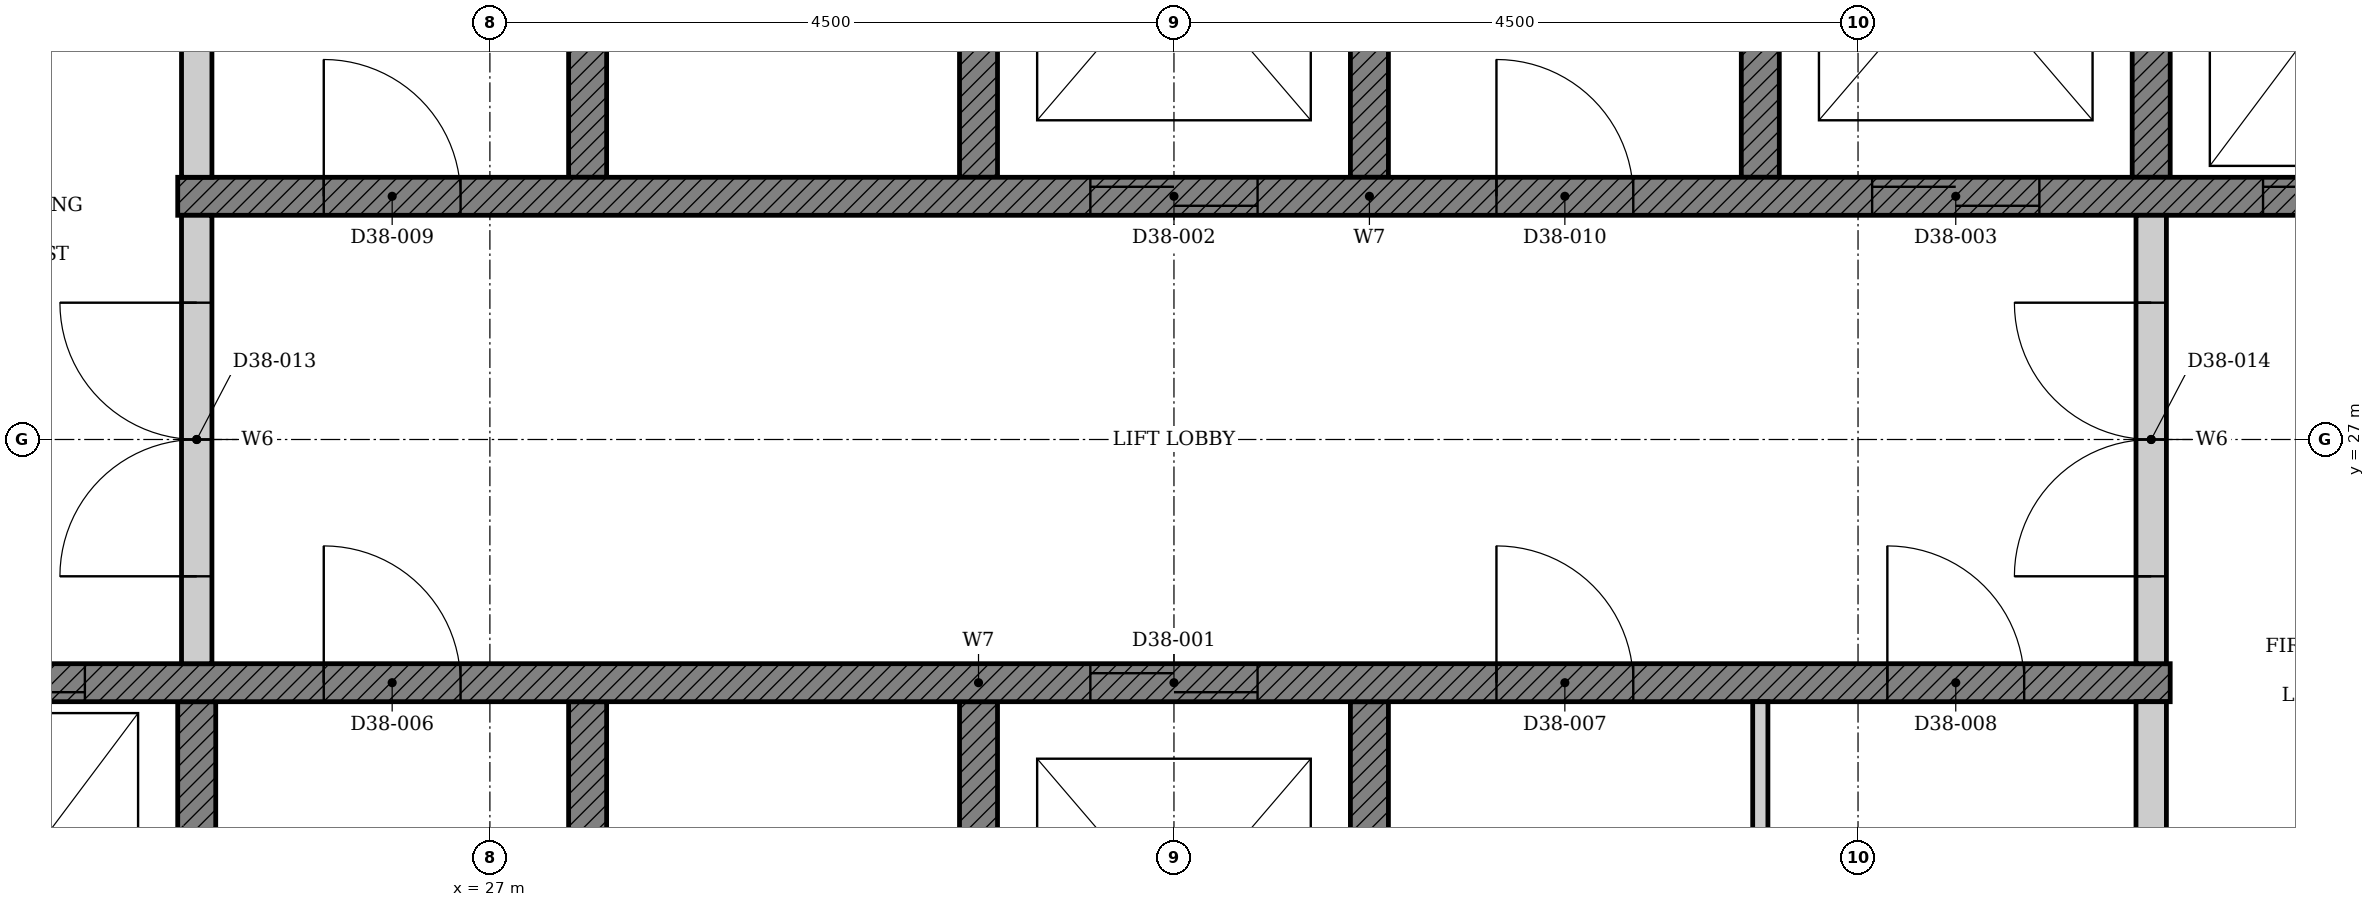
"""IFC4 building model, lengths in metres.
Left out: names, types, materials, properties, quantities, classifications, styles, units other than length and angle.
Written with IfcOpenShell. Run it as: python <this file> out.ifc"""

import sys

from ifc_helpers import new_model, si_unit, direction, frame, frame_2d, origin, place, context, subcontext, project, spatial, polyline, rectangle, outline, extrude, element, fill, save


model = new_model("IFC4")
c1 = context("Model", 3, precision=1e-05, world=origin(), true_north=direction((0.0, 1.0)))
c2 = subcontext(c1, "Body", "Model", "MODEL_VIEW")
j1 = project(units=[si_unit("LENGTHUNIT", "METRE"), si_unit("PLANEANGLEUNIT", "RADIAN")], contexts=[c1])
p1 = place(None, origin())
s1 = spatial("IfcSite", under=j1, at=p1, CompositionType="ELEMENT")
p2 = place(p1, origin())
s2 = spatial("IfcBuilding", under=s1, at=p2, CompositionType="ELEMENT")
p3 = place(p2, frame((0.0, 0.0, 154.3)))
s3 = spatial("IfcBuildingStorey", under=s2, at=p3, CompositionType="ELEMENT", Elevation=154.3)
p4 = place(p3, origin())
e1 = element("IfcWall", 1, at=p4, inside=s3, PredefinedType="SHEAR", context=c2, shape_type="SweptSolid", body=[
    extrude(outline(polyline([(22.375, 22.35), (25.197, 22.35), (25.197, 25.275), (24.947, 25.275), (24.947, 22.65), (22.625, 22.65), (22.625, 25.275), (22.375, 25.275), (22.375, 22.35)])), origin(), (0.0, 0.0, 1.0), 3.4),
])
p5 = place(p3, origin())
e2 = element("IfcWall", 2, at=p5, inside=s3, PredefinedType="SHEAR", context=c2, shape_type="SweptSolid", body=[
    extrude(outline(polyline([(27.518, 22.35), (32.911, 22.35), (32.911, 25.275), (32.661, 25.275), (32.661, 22.65), (30.339, 22.65), (30.339, 25.275), (30.089, 25.275), (30.089, 22.65), (27.768, 22.65), (27.768, 25.275), (27.518, 25.275), (27.518, 22.35)])), origin(), (0.0, 0.0, 1.0), 3.4),
])
p6 = place(p3, origin())
e3 = element("IfcWall", 3, at=p6, inside=s3, PredefinedType="SHEAR", context=c2, shape_type="SweptSolid", body=[
    extrude(outline(polyline([(27.518, 28.725), (27.768, 28.725), (27.768, 31.35), (30.089, 31.35), (30.089, 28.725), (30.339, 28.725), (30.339, 31.35), (32.661, 31.35), (32.661, 28.725), (32.911, 28.725), (32.911, 31.65), (27.518, 31.65), (27.518, 28.725)])), origin(), (0.0, 0.0, 1.0), 3.4),
])
p7 = place(p3, origin())
e4 = element("IfcWall", 4, at=p7, inside=s3, PredefinedType="SHEAR", context=c2, shape_type="SweptSolid", body=[
    extrude(outline(polyline([(35.232, 28.725), (35.482, 28.725), (35.482, 31.35), (37.803, 31.35), (37.803, 28.725), (38.053, 28.725), (38.053, 31.35), (40.375, 31.35), (40.375, 28.725), (40.625, 28.725), (40.625, 31.65), (35.232, 31.65), (35.232, 28.725)])), origin(), (0.0, 0.0, 1.0), 3.4),
])
p8 = place(p3, frame((22.375, 25.4, 0.0), z_axis=(0.0, 0.0, 1.0), x_axis=(1.0, 0.0, 0.0)))
e5 = element("IfcWall", 5, at=p8, inside=s3, PredefinedType="SHEAR", context=c2, shape_type="SweptSolid", body=[
    extrude(rectangle(XDim=15.678, YDim=0.25, at=frame_2d((7.839, 0.0))), origin(), (0.0, 0.0, 1.0), 3.4),
])
p9 = place(p8, frame((8.575, 0.0, 0.0)))
e6 = element("IfcOpeningElement", 6, at=p9, cuts=e5, PredefinedType="OPENING", context=c2, shape_type="SweptSolid", body=[
    extrude(rectangle(XDim=1.1, YDim=2.1, at=frame_2d((0.55, 1.05))), frame((0.0, 0.135, 0.0), z_axis=(0.0, -1.0, 0.0), x_axis=(1.0, 0.0, 0.0)), (0.0, 0.0, 1.0), 0.27),
])
p10 = place(p8, frame((0.861, 0.0, 0.0)))
e7 = element("IfcOpeningElement", 7, at=p10, cuts=e5, PredefinedType="OPENING", context=c2, shape_type="SweptSolid", body=[
    extrude(rectangle(XDim=1.1, YDim=2.1, at=frame_2d((0.55, 1.05))), frame((0.0, 0.135, 0.0), z_axis=(0.0, -1.0, 0.0), x_axis=(1.0, 0.0, 0.0)), (0.0, 0.0, 1.0), 0.27),
])
p11 = place(p8, frame((3.532, 0.0, 0.0)))
e8 = element("IfcOpeningElement", 8, at=p11, cuts=e5, PredefinedType="OPENING", context=c2, shape_type="SweptSolid", body=[
    extrude(rectangle(XDim=0.9, YDim=2.1, at=frame_2d((0.45, 1.05))), frame((0.0, 0.135, 0.0), z_axis=(0.0, -1.0, 0.0), x_axis=(1.0, 0.0, 0.0)), (0.0, 0.0, 1.0), 0.27),
])
p12 = place(p8, frame((11.246, 0.0, 0.0)))
e9 = element("IfcOpeningElement", 9, at=p12, cuts=e5, PredefinedType="OPENING", context=c2, shape_type="SweptSolid", body=[
    extrude(rectangle(XDim=0.9, YDim=2.1, at=frame_2d((0.45, 1.05))), frame((0.0, 0.135, 0.0), z_axis=(0.0, -1.0, 0.0), x_axis=(1.0, 0.0, 0.0)), (0.0, 0.0, 1.0), 0.27),
])
p13 = place(p8, frame((13.818, 0.0, 0.0)))
e10 = element("IfcOpeningElement", 10, at=p13, cuts=e5, PredefinedType="OPENING", context=c2, shape_type="SweptSolid", body=[
    extrude(rectangle(XDim=0.9, YDim=2.1, at=frame_2d((0.45, 1.05))), frame((0.0, 0.135, 0.0), z_axis=(0.0, -1.0, 0.0), x_axis=(1.0, 0.0, 0.0)), (0.0, 0.0, 1.0), 0.27),
])
p14 = place(p3, frame((24.947, 28.6, 0.0), z_axis=(0.0, 0.0, 1.0), x_axis=(1.0, 0.0, 0.0)))
e11 = element("IfcWall", 11, at=p14, inside=s3, PredefinedType="SHEAR", context=c2, shape_type="SweptSolid", body=[
    extrude(rectangle(XDim=15.678, YDim=0.25, at=frame_2d((7.839, 0.0))), origin(), (0.0, 0.0, 1.0), 3.4),
])
p15 = place(p14, frame((6.004, 0.0, 0.0)))
e12 = element("IfcOpeningElement", 12, at=p15, cuts=e11, PredefinedType="OPENING", context=c2, shape_type="SweptSolid", body=[
    extrude(rectangle(XDim=1.1, YDim=2.1, at=frame_2d((0.55, 1.05))), frame((0.0, 0.135, 0.0), z_axis=(0.0, -1.0, 0.0), x_axis=(1.0, 0.0, 0.0)), (0.0, 0.0, 1.0), 0.27),
])
p16 = place(p14, frame((11.146, 0.0, 0.0)))
e13 = element("IfcOpeningElement", 13, at=p16, cuts=e11, PredefinedType="OPENING", context=c2, shape_type="SweptSolid", body=[
    extrude(rectangle(XDim=1.1, YDim=2.1, at=frame_2d((0.55, 1.05))), frame((0.0, 0.135, 0.0), z_axis=(0.0, -1.0, 0.0), x_axis=(1.0, 0.0, 0.0)), (0.0, 0.0, 1.0), 0.27),
])
p17 = place(p14, frame((13.718, 0.0, 0.0)))
e14 = element("IfcOpeningElement", 14, at=p17, cuts=e11, PredefinedType="OPENING", context=c2, shape_type="SweptSolid", body=[
    extrude(rectangle(XDim=1.1, YDim=2.1, at=frame_2d((0.55, 1.05))), frame((0.0, 0.135, 0.0), z_axis=(0.0, -1.0, 0.0), x_axis=(1.0, 0.0, 0.0)), (0.0, 0.0, 1.0), 0.27),
])
p18 = place(p14, frame((0.961, 0.0, 0.0)))
e15 = element("IfcOpeningElement", 15, at=p18, cuts=e11, PredefinedType="OPENING", context=c2, shape_type="SweptSolid", body=[
    extrude(rectangle(XDim=0.9, YDim=2.1, at=frame_2d((0.45, 1.05))), frame((0.0, 0.135, 0.0), z_axis=(0.0, -1.0, 0.0), x_axis=(1.0, 0.0, 0.0)), (0.0, 0.0, 1.0), 0.27),
])
p19 = place(p14, frame((8.675, 0.0, 0.0)))
e16 = element("IfcOpeningElement", 16, at=p19, cuts=e11, PredefinedType="OPENING", context=c2, shape_type="SweptSolid", body=[
    extrude(rectangle(XDim=0.9, YDim=2.1, at=frame_2d((0.45, 1.05))), frame((0.0, 0.135, 0.0), z_axis=(0.0, -1.0, 0.0), x_axis=(1.0, 0.0, 0.0)), (0.0, 0.0, 1.0), 0.27),
])
p20 = place(p3, frame((37.928, 22.65, 0.0), z_axis=(0.0, 0.0, 1.0), x_axis=(0.0, 1.0, 0.0)))
e17 = element("IfcWall", 17, at=p20, inside=s3, PredefinedType="PARTITIONING", context=c2, shape_type="SweptSolid", body=[
    extrude(rectangle(XDim=2.625, YDim=0.2, at=frame_2d((1.312, 0.0))), origin(), (0.0, 0.0, 1.0), 3.4),
])
p21 = place(p3, frame((35.357, 22.65, 0.0), z_axis=(0.0, 0.0, 1.0), x_axis=(0.0, 1.0, 0.0)))
e18 = element("IfcWall", 18, at=p21, inside=s3, PredefinedType="PARTITIONING", context=c2, shape_type="SweptSolid", body=[
    extrude(rectangle(XDim=2.625, YDim=0.1, at=frame_2d((1.312, 0.0))), origin(), (0.0, 0.0, 1.0), 3.4),
])
p22 = place(p3, frame((25.072, 28.725, 0.0), z_axis=(0.0, 0.0, 1.0), x_axis=(0.0, 1.0, 0.0)))
e19 = element("IfcWall", 19, at=p22, inside=s3, PredefinedType="PARTITIONING", context=c2, shape_type="SweptSolid", body=[
    extrude(rectangle(XDim=2.625, YDim=0.2, at=frame_2d((1.312, 0.0))), origin(), (0.0, 0.0, 1.0), 3.4),
])
p23 = place(p3, frame((25.072, 25.525, 0.0), z_axis=(0.0, 0.0, 1.0), x_axis=(0.0, 1.0, 0.0)))
e20 = element("IfcWall", 20, at=p23, inside=s3, PredefinedType="PARTITIONING", context=c2, shape_type="SweptSolid", body=[
    extrude(rectangle(XDim=2.95, YDim=0.2, at=frame_2d((1.475, 0.0))), origin(), (0.0, 0.0, 1.0), 3.4),
])
p24 = place(p23, frame((0.575, 0.0, 0.0)))
e21 = element("IfcOpeningElement", 21, at=p24, cuts=e20, PredefinedType="OPENING", context=c2, shape_type="SweptSolid", body=[
    extrude(rectangle(XDim=1.8, YDim=2.1, at=frame_2d((0.9, 1.05))), frame((0.0, 0.11, 0.0), z_axis=(0.0, -1.0, 0.0), x_axis=(1.0, 0.0, 0.0)), (0.0, 0.0, 1.0), 0.22),
])
p25 = place(p3, frame((37.928, 25.525, 0.0), z_axis=(0.0, 0.0, 1.0), x_axis=(0.0, 1.0, 0.0)))
e22 = element("IfcWall", 22, at=p25, inside=s3, PredefinedType="PARTITIONING", context=c2, shape_type="SweptSolid", body=[
    extrude(rectangle(XDim=2.95, YDim=0.2, at=frame_2d((1.475, 0.0))), origin(), (0.0, 0.0, 1.0), 3.4),
])
p26 = place(p25, frame((0.575, 0.0, 0.0)))
e23 = element("IfcOpeningElement", 23, at=p26, cuts=e22, PredefinedType="OPENING", context=c2, shape_type="SweptSolid", body=[
    extrude(rectangle(XDim=1.8, YDim=2.1, at=frame_2d((0.9, 1.05))), frame((0.0, 0.11, 0.0), z_axis=(0.0, -1.0, 0.0), x_axis=(1.0, 0.0, 0.0)), (0.0, 0.0, 1.0), 0.22),
])
p27 = place(p9, origin())
e24 = element("IfcDoor", 24, at=p27, inside=s3, OperationType="DOUBLE_DOOR_SLIDING", PredefinedType="DOOR", context=c2, shape_type="SweptSolid", body=[
    extrude(rectangle(XDim=1.1, YDim=2.1, at=frame_2d((0.55, 1.05))), frame((0.0, 0.025, 0.0), z_axis=(0.0, -1.0, 0.0), x_axis=(1.0, 0.0, 0.0)), (0.0, 0.0, 1.0), 0.05),
])
fill(e6, e24)
p28 = place(p15, origin())
e25 = element("IfcDoor", 25, at=p28, inside=s3, OperationType="DOUBLE_DOOR_SLIDING", PredefinedType="DOOR", context=c2, shape_type="SweptSolid", body=[
    extrude(rectangle(XDim=1.1, YDim=2.1, at=frame_2d((0.55, 1.05))), frame((0.0, 0.025, 0.0), z_axis=(0.0, -1.0, 0.0), x_axis=(1.0, 0.0, 0.0)), (0.0, 0.0, 1.0), 0.05),
])
fill(e12, e25)
p29 = place(p16, origin())
e26 = element("IfcDoor", 26, at=p29, inside=s3, OperationType="DOUBLE_DOOR_SLIDING", PredefinedType="DOOR", context=c2, shape_type="SweptSolid", body=[
    extrude(rectangle(XDim=1.1, YDim=2.1, at=frame_2d((0.55, 1.05))), frame((0.0, 0.025, 0.0), z_axis=(0.0, -1.0, 0.0), x_axis=(1.0, 0.0, 0.0)), (0.0, 0.0, 1.0), 0.05),
])
fill(e13, e26)
p30 = place(p10, origin())
e27 = element("IfcDoor", 27, at=p30, inside=s3, OperationType="DOUBLE_DOOR_SLIDING", PredefinedType="DOOR", context=c2, shape_type="SweptSolid", body=[
    extrude(rectangle(XDim=1.1, YDim=2.1, at=frame_2d((0.55, 1.05))), frame((0.0, 0.025, 0.0), z_axis=(0.0, -1.0, 0.0), x_axis=(1.0, 0.0, 0.0)), (0.0, 0.0, 1.0), 0.05),
])
fill(e7, e27)
p31 = place(p17, origin())
e28 = element("IfcDoor", 28, at=p31, inside=s3, OperationType="DOUBLE_DOOR_SLIDING", PredefinedType="DOOR", context=c2, shape_type="SweptSolid", body=[
    extrude(rectangle(XDim=1.1, YDim=2.1, at=frame_2d((0.55, 1.05))), frame((0.0, 0.025, 0.0), z_axis=(0.0, -1.0, 0.0), x_axis=(1.0, 0.0, 0.0)), (0.0, 0.0, 1.0), 0.05),
])
fill(e14, e28)
p32 = place(p11, origin())
e29 = element("IfcDoor", 29, at=p32, inside=s3, OperationType="SINGLE_SWING_LEFT", PredefinedType="DOOR", context=c2, shape_type="SweptSolid", body=[
    extrude(rectangle(XDim=0.9, YDim=2.1, at=frame_2d((0.45, 1.05))), frame((0.0, 0.025, 0.0), z_axis=(0.0, -1.0, 0.0), x_axis=(1.0, 0.0, 0.0)), (0.0, 0.0, 1.0), 0.05),
])
fill(e8, e29)
p33 = place(p12, origin())
e30 = element("IfcDoor", 30, at=p33, inside=s3, OperationType="SINGLE_SWING_LEFT", PredefinedType="DOOR", context=c2, shape_type="SweptSolid", body=[
    extrude(rectangle(XDim=0.9, YDim=2.1, at=frame_2d((0.45, 1.05))), frame((0.0, 0.025, 0.0), z_axis=(0.0, -1.0, 0.0), x_axis=(1.0, 0.0, 0.0)), (0.0, 0.0, 1.0), 0.05),
])
fill(e9, e30)
p34 = place(p13, origin())
e31 = element("IfcDoor", 31, at=p34, inside=s3, OperationType="SINGLE_SWING_LEFT", PredefinedType="DOOR", context=c2, shape_type="SweptSolid", body=[
    extrude(rectangle(XDim=0.9, YDim=2.1, at=frame_2d((0.45, 1.05))), frame((0.0, 0.025, 0.0), z_axis=(0.0, -1.0, 0.0), x_axis=(1.0, 0.0, 0.0)), (0.0, 0.0, 1.0), 0.05),
])
fill(e10, e31)
p35 = place(p18, origin())
e32 = element("IfcDoor", 32, at=p35, inside=s3, OperationType="SINGLE_SWING_LEFT", PredefinedType="DOOR", context=c2, shape_type="SweptSolid", body=[
    extrude(rectangle(XDim=0.9, YDim=2.1, at=frame_2d((0.45, 1.05))), frame((0.0, 0.025, 0.0), z_axis=(0.0, -1.0, 0.0), x_axis=(1.0, 0.0, 0.0)), (0.0, 0.0, 1.0), 0.05),
])
fill(e15, e32)
p36 = place(p19, origin())
e33 = element("IfcDoor", 33, at=p36, inside=s3, OperationType="SINGLE_SWING_LEFT", PredefinedType="DOOR", context=c2, shape_type="SweptSolid", body=[
    extrude(rectangle(XDim=0.9, YDim=2.1, at=frame_2d((0.45, 1.05))), frame((0.0, 0.025, 0.0), z_axis=(0.0, -1.0, 0.0), x_axis=(1.0, 0.0, 0.0)), (0.0, 0.0, 1.0), 0.05),
])
fill(e16, e33)
p37 = place(p24, origin())
e34 = element("IfcDoor", 34, at=p37, inside=s3, OperationType="DOUBLE_DOOR_SINGLE_SWING", PredefinedType="DOOR", context=c2, shape_type="SweptSolid", body=[
    extrude(rectangle(XDim=1.8, YDim=2.1, at=frame_2d((0.9, 1.05))), frame((0.0, 0.025, 0.0), z_axis=(0.0, -1.0, 0.0), x_axis=(1.0, 0.0, 0.0)), (0.0, 0.0, 1.0), 0.05),
])
fill(e21, e34)
p38 = place(p26, origin())
e35 = element("IfcDoor", 35, at=p38, inside=s3, OperationType="DOUBLE_DOOR_SINGLE_SWING", PredefinedType="DOOR", context=c2, shape_type="SweptSolid", body=[
    extrude(rectangle(XDim=1.8, YDim=2.1, at=frame_2d((0.9, 1.05))), frame((0.0, 0.025, 0.0), z_axis=(0.0, -1.0, 0.0), x_axis=(1.0, 0.0, 0.0)), (0.0, 0.0, 1.0), 0.05),
])
fill(e23, e35)
save(model, sys.argv[1])
